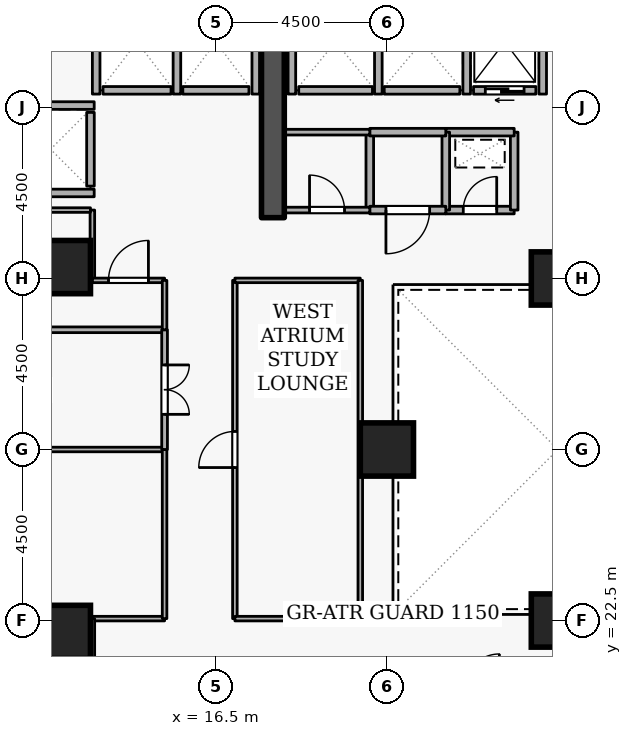
"""IFC4 building model, lengths in metres.
Left out: names, types, materials, properties, quantities, classifications, styles, units other than length and angle.
Written with IfcOpenShell. Run it as: python <this file> out.ifc"""

import sys

from ifc_helpers import new_model, si_unit, direction, frame, frame_2d, origin, origin_2d, place, context, subcontext, project, spatial, rectangle, extrude, element, fill, save


model = new_model("IFC4")
c1 = context("Model", 3, precision=1e-05, world=origin(), true_north=direction((0.0, 1.0)))
c2 = subcontext(c1, "Body", "Model", "MODEL_VIEW")
j1 = project(units=[si_unit("LENGTHUNIT", "METRE"), si_unit("PLANEANGLEUNIT", "RADIAN")], contexts=[c1])
p1 = place(None, origin())
s1 = spatial("IfcSite", under=j1, at=p1, CompositionType="ELEMENT")
p2 = place(p1, origin())
s2 = spatial("IfcBuilding", under=s1, at=p2, CompositionType="ELEMENT")
p3 = place(p2, frame((0.0, 0.0, 38.7)))
s3 = spatial("IfcBuildingStorey", under=s2, at=p3, CompositionType="ELEMENT", Elevation=38.7)
p4 = place(p3, frame((18.0, 33.1, 0.0), z_axis=(0.0, 0.0, 1.0), x_axis=(0.0, 1.0, 0.0)))
e1 = element("IfcWall", 1, at=p4, inside=s3, PredefinedType="SHEAR", context=c2, shape_type="SweptSolid", body=[
    extrude(rectangle(XDim=5.7, YDim=0.6, at=frame_2d((2.85, 0.0))), origin(), (0.0, 0.0, 1.0), 3.6),
])
for number, where, z_axis, x_axis in (
    (2, (12.5, 22.2, 0.0), (0.0, 0.0, 1.0), (1.0, 0.0, 0.0)),
    (3, (12.5, 31.8, 0.0), (0.0, 0.0, 1.0), (1.0, 0.0, 0.0)),
    (4, (25.5, 22.5, 0.0), (0.0, 0.0, 1.0), (1.0, 0.0, 0.0)),
    (5, (25.5, 31.5, 0.0), (0.0, 0.0, 1.0), (1.0, 0.0, 0.0)),
    (6, (21.0, 27.0, 0.0), (0.0, 0.0, 1.0), (1.0, 0.0, 0.0)),
):
    element("IfcColumn", number, at=place(p3, frame(where, z_axis=z_axis, x_axis=x_axis)), inside=s3, PredefinedType="COLUMN", context=c2, shape_type="SweptSolid", body=[
        extrude(rectangle(XDim=1.4, YDim=1.4, at=origin_2d()), origin(), (0.0, 0.0, 1.0), 3.6),
    ])
p5 = place(p3, frame((24.92, 36.45, 0.0), z_axis=(0.0, 0.0, 1.0), x_axis=(-1.0, 0.0, 0.0)))
e7 = element("IfcWall", 7, at=p5, inside=s3, PredefinedType="STANDARD", context=c2, shape_type="SweptSolid", body=[
    extrude(rectangle(XDim=1.64, YDim=0.2, at=frame_2d((0.82, 0.0))), origin(), (0.0, 0.0, 1.0), 3.34),
])
p6 = place(p5, frame((0.31, 0.0, 0.0)))
e8 = element("IfcOpeningElement", 8, at=p6, cuts=e7, PredefinedType="OPENING", context=c2, shape_type="SweptSolid", body=[
    extrude(rectangle(XDim=1.02, YDim=2.06, at=frame_2d((0.51, 1.03))), frame((0.0, 0.11, 0.0), z_axis=(0.0, -1.0, 0.0), x_axis=(1.0, 0.0, 0.0)), (0.0, 0.0, 1.0), 0.22),
])
p7 = place(p3, frame((22.92, 36.45, 0.0), z_axis=(0.0, 0.0, 1.0), x_axis=(-1.0, 0.0, 0.0)))
e9 = element("IfcWall", 9, at=p7, inside=s3, PredefinedType="STANDARD", context=c2, shape_type="SweptSolid", body=[
    extrude(rectangle(XDim=1.99, YDim=0.2, at=frame_2d((0.995, 0.0))), origin(), (0.0, 0.0, 1.0), 3.34),
])
p8 = place(p3, frame((20.62, 36.45, 0.0), z_axis=(0.0, 0.0, 1.0), x_axis=(-1.0, 0.0, 0.0)))
e10 = element("IfcWall", 10, at=p8, inside=s3, PredefinedType="STANDARD", context=c2, shape_type="SweptSolid", body=[
    extrude(rectangle(XDim=1.94, YDim=0.2, at=frame_2d((0.97, 0.0))), origin(), (0.0, 0.0, 1.0), 3.34),
])
p9 = place(p3, frame((17.37, 36.45, 0.0), z_axis=(0.0, 0.0, 1.0), x_axis=(-1.0, 0.0, 0.0)))
e11 = element("IfcWall", 11, at=p9, inside=s3, PredefinedType="STANDARD", context=c2, shape_type="SweptSolid", body=[
    extrude(rectangle(XDim=1.74, YDim=0.2, at=frame_2d((0.87, 0.0))), origin(), (0.0, 0.0, 1.0), 3.34),
])
p10 = place(p3, frame((15.32, 36.45, 0.0), z_axis=(0.0, 0.0, 1.0), x_axis=(-1.0, 0.0, 0.0)))
e12 = element("IfcWall", 12, at=p10, inside=s3, PredefinedType="STANDARD", context=c2, shape_type="SweptSolid", body=[
    extrude(rectangle(XDim=1.79, YDim=0.2, at=frame_2d((0.895, 0.0))), origin(), (0.0, 0.0, 1.0), 3.34),
])
p11 = place(p3, frame((13.2, 33.93, 0.0), z_axis=(0.0, 0.0, 1.0), x_axis=(0.0, 1.0, 0.0)))
e13 = element("IfcWall", 13, at=p11, inside=s3, PredefinedType="STANDARD", context=c2, shape_type="SweptSolid", body=[
    extrude(rectangle(XDim=1.94, YDim=0.2, at=frame_2d((0.97, 0.0))), origin(), (0.0, 0.0, 1.0), 3.34),
])
for number, where, z_axis, x_axis in (
    (14, (25.1, 36.352, 0.0), (0.0, 0.0, 1.0), (0.0, 1.0, 0.0)),
    (15, (23.1, 36.352, 0.0), (0.0, 0.0, 1.0), (0.0, 1.0, 0.0)),
    (16, (20.775, 36.352, 0.0), (0.0, 0.0, 1.0), (0.0, 1.0, 0.0)),
    (17, (18.5, 36.352, 0.0), (0.0, 0.0, 1.0), (0.0, 1.0, 0.0)),
):
    element("IfcWall", number, at=place(p3, frame(where, z_axis=z_axis, x_axis=x_axis)), inside=s3, PredefinedType="STANDARD", context=c2, shape_type="SweptSolid", body=[
        extrude(rectangle(XDim=2.436, YDim=0.2, at=frame_2d((1.218, 0.0))), origin(), (0.0, 0.0, 1.0), 3.34),
    ])
p12 = place(p3, frame((17.55, 36.352, 0.0), z_axis=(0.0, 0.0, 1.0), x_axis=(0.0, 1.0, 0.0)))
e18 = element("IfcWall", 18, at=p12, inside=s3, PredefinedType="STANDARD", context=c2, shape_type="SweptSolid", body=[
    extrude(rectangle(XDim=2.636, YDim=0.2, at=frame_2d((1.318, 0.0))), origin(), (0.0, 0.0, 1.0), 2.545),
])
for number, where, z_axis, x_axis in (
    (19, (15.475, 36.352, 0.0), (0.0, 0.0, 1.0), (0.0, 1.0, 0.0)),
    (20, (13.35, 36.352, 0.0), (0.0, 0.0, 1.0), (0.0, 1.0, 0.0)),
):
    element("IfcWall", number, at=place(p3, frame(where, z_axis=z_axis, x_axis=x_axis)), inside=s3, PredefinedType="STANDARD", context=c2, shape_type="SweptSolid", body=[
        extrude(rectangle(XDim=2.636, YDim=0.2, at=frame_2d((1.318, 0.0))), origin(), (0.0, 0.0, 1.0), 3.34),
    ])
for number, where, z_axis, x_axis in (
    (21, (11.002, 36.05, 0.0), (0.0, 0.0, 1.0), (1.0, 0.0, 0.0)),
    (22, (11.002, 33.75, 0.0), (0.0, 0.0, 1.0), (1.0, 0.0, 0.0)),
):
    element("IfcWall", number, at=place(p3, frame(where, z_axis=z_axis, x_axis=x_axis)), inside=s3, PredefinedType="STANDARD", context=c2, shape_type="SweptSolid", body=[
        extrude(rectangle(XDim=2.296, YDim=0.2, at=frame_2d((1.148, 0.0))), origin(), (0.0, 0.0, 1.0), 3.34),
    ])
p13 = place(p3, frame((22.55, 33.3, 0.0), z_axis=(0.0, 0.0, 1.0), x_axis=(1.0, 0.0, 0.0)))
e23 = element("IfcWall", 23, at=p13, inside=s3, PredefinedType="STANDARD", context=c2, shape_type="SweptSolid", body=[
    extrude(rectangle(XDim=1.8, YDim=0.2, at=frame_2d((0.9, 0.0))), origin(), (0.0, 0.0, 1.0), 3.34),
])
p14 = place(p13, frame((0.46, 0.0, 0.0)))
e24 = element("IfcOpeningElement", 24, at=p14, cuts=e23, PredefinedType="OPENING", context=c2, shape_type="SweptSolid", body=[
    extrude(rectangle(XDim=0.88, YDim=2.04, at=frame_2d((0.44, 1.02))), frame((0.0, 0.11, 0.0), z_axis=(0.0, -1.0, 0.0), x_axis=(1.0, 0.0, 0.0)), (0.0, 0.0, 1.0), 0.22),
])
p15 = place(p3, frame((24.35, 33.3, 0.0), z_axis=(0.0, 0.0, 1.0), x_axis=(0.0, 1.0, 0.0)))
e25 = element("IfcWall", 25, at=p15, inside=s3, PredefinedType="STANDARD", context=c2, shape_type="SweptSolid", body=[
    extrude(rectangle(XDim=2.05, YDim=0.2, at=frame_2d((1.025, 0.0))), origin(), (0.0, 0.0, 1.0), 3.34),
])
p16 = place(p3, frame((24.35, 35.35, 0.0), z_axis=(0.0, 0.0, 1.0), x_axis=(-1.0, 0.0, 0.0)))
e26 = element("IfcWall", 26, at=p16, inside=s3, PredefinedType="STANDARD", context=c2, shape_type="SweptSolid", body=[
    extrude(rectangle(XDim=1.8, YDim=0.2, at=frame_2d((0.9, 0.0))), origin(), (0.0, 0.0, 1.0), 3.34),
])
for number, where, z_axis, x_axis in (
    (27, (22.55, 35.35, 0.0), (0.0, 0.0, 1.0), (0.0, -1.0, 0.0)),
    (28, (20.55, 33.3, 0.0), (0.0, 0.0, 1.0), (0.0, 1.0, 0.0)),
):
    element("IfcWall", number, at=place(p3, frame(where, z_axis=z_axis, x_axis=x_axis)), inside=s3, PredefinedType="STANDARD", context=c2, shape_type="SweptSolid", body=[
        extrude(rectangle(XDim=2.05, YDim=0.2, at=frame_2d((1.025, 0.0))), origin(), (0.0, 0.0, 1.0), 3.34),
    ])
p17 = place(p3, frame((20.55, 35.35, 0.0), z_axis=(0.0, 0.0, 1.0), x_axis=(1.0, 0.0, 0.0)))
e29 = element("IfcWall", 29, at=p17, inside=s3, PredefinedType="STANDARD", context=c2, shape_type="SweptSolid", body=[
    extrude(rectangle(XDim=2.0, YDim=0.2, at=frame_2d((1.0, 0.0))), origin(), (0.0, 0.0, 1.0), 3.34),
])
p18 = place(p3, frame((22.55, 33.3, 0.0), z_axis=(0.0, 0.0, 1.0), x_axis=(-1.0, 0.0, 0.0)))
e30 = element("IfcWall", 30, at=p18, inside=s3, PredefinedType="STANDARD", context=c2, shape_type="SweptSolid", body=[
    extrude(rectangle(XDim=2.0, YDim=0.2, at=frame_2d((1.0, 0.0))), origin(), (0.0, 0.0, 1.0), 3.34),
])
p19 = place(p18, frame((0.425, 0.0, 0.0)))
e31 = element("IfcOpeningElement", 31, at=p19, cuts=e30, PredefinedType="OPENING", context=c2, shape_type="SweptSolid", body=[
    extrude(rectangle(XDim=1.15, YDim=2.1, at=frame_2d((0.575, 1.05))), frame((0.0, 0.11, 0.0), z_axis=(0.0, -1.0, 0.0), x_axis=(1.0, 0.0, 0.0)), (0.0, 0.0, 1.0), 0.22),
])
p20 = place(p3, frame((18.3, 33.3, 0.0), z_axis=(0.0, 0.0, 1.0), x_axis=(1.0, 0.0, 0.0)))
e32 = element("IfcWall", 32, at=p20, inside=s3, PredefinedType="PARTITIONING", context=c2, shape_type="SweptSolid", body=[
    extrude(rectangle(XDim=2.25, YDim=0.15, at=frame_2d((1.125, 0.0))), origin(), (0.0, 0.0, 1.0), 3.34),
])
p21 = place(p20, frame((0.665, 0.0, 0.0)))
e33 = element("IfcOpeningElement", 33, at=p21, cuts=e32, PredefinedType="OPENING", context=c2, shape_type="SweptSolid", body=[
    extrude(rectangle(XDim=0.92, YDim=2.08, at=frame_2d((0.46, 1.04))), frame((0.0, 0.085, 0.0), z_axis=(0.0, -1.0, 0.0), x_axis=(1.0, 0.0, 0.0)), (0.0, 0.0, 1.0), 0.17),
])
p22 = place(p3, frame((20.55, 35.35, 0.0), z_axis=(0.0, 0.0, 1.0), x_axis=(-1.0, 0.0, 0.0)))
e34 = element("IfcWall", 34, at=p22, inside=s3, PredefinedType="PARTITIONING", context=c2, shape_type="SweptSolid", body=[
    extrude(rectangle(XDim=2.25, YDim=0.15, at=frame_2d((1.125, 0.0))), origin(), (0.0, 0.0, 1.0), 3.34),
])
p23 = place(p3, frame((15.15, 22.55, 0.0), z_axis=(0.0, 0.0, 1.0), x_axis=(-1.0, 0.0, 0.0)))
e35 = element("IfcWall", 35, at=p23, inside=s3, PredefinedType="PARTITIONING", context=c2, shape_type="SweptSolid", body=[
    extrude(rectangle(XDim=1.9, YDim=0.12, at=frame_2d((0.95, 0.0))), origin(), (0.0, 0.0, 1.0), 3.34),
])
p24 = place(p3, frame((13.25, 22.55, 0.0), z_axis=(0.0, 0.0, 1.0), x_axis=(0.0, -1.0, 0.0)))
e36 = element("IfcWall", 36, at=p24, inside=s3, PredefinedType="PARTITIONING", context=c2, shape_type="SweptSolid", body=[
    extrude(rectangle(XDim=1.85, YDim=0.12, at=frame_2d((0.925, 0.0))), origin(), (0.0, 0.0, 1.0), 3.34),
])
p25 = place(p3, frame((1.28, 27.0, 0.0), z_axis=(0.0, 0.0, 1.0), x_axis=(1.0, 0.0, 0.0)))
e37 = element("IfcWall", 37, at=p25, inside=s3, PredefinedType="PARTITIONING", context=c2, shape_type="SweptSolid", body=[
    extrude(rectangle(XDim=13.87, YDim=0.12, at=frame_2d((6.935, 0.0))), origin(), (0.0, 0.0, 1.0), 2.882),
])
p26 = place(p3, frame((15.15, 27.0, 0.0), z_axis=(0.0, 0.0, 1.0), x_axis=(0.0, -1.0, 0.0)))
e38 = element("IfcWall", 38, at=p26, inside=s3, PredefinedType="PARTITIONING", context=c2, shape_type="SweptSolid", body=[
    extrude(rectangle(XDim=4.45, YDim=0.12, at=frame_2d((2.225, 0.0))), origin(), (0.0, 0.0, 1.0), 3.34),
])
p27 = place(p3, frame((1.28, 30.15, 0.0), z_axis=(0.0, 0.0, 1.0), x_axis=(1.0, 0.0, 0.0)))
e39 = element("IfcWall", 39, at=p27, inside=s3, PredefinedType="PARTITIONING", context=c2, shape_type="SweptSolid", body=[
    extrude(rectangle(XDim=13.87, YDim=0.15, at=frame_2d((6.935, 0.0))), origin(), (0.0, 0.0, 1.0), 3.34),
])
p28 = place(p3, frame((15.15, 30.15, 0.0), z_axis=(0.0, 0.0, 1.0), x_axis=(0.0, -1.0, 0.0)))
e40 = element("IfcWall", 40, at=p28, inside=s3, PredefinedType="PARTITIONING", context=c2, shape_type="SweptSolid", body=[
    extrude(rectangle(XDim=3.15, YDim=0.15, at=frame_2d((1.575, 0.0))), origin(), (0.0, 0.0, 1.0), 3.34),
])
p29 = place(p28, frame((0.925, 0.0, 0.0)))
e41 = element("IfcOpeningElement", 41, at=p29, cuts=e40, PredefinedType="OPENING", context=c2, shape_type="SweptSolid", body=[
    extrude(rectangle(XDim=1.3, YDim=2.12, at=frame_2d((0.65, 1.06))), frame((0.0, 0.085, 0.0), z_axis=(0.0, -1.0, 0.0), x_axis=(1.0, 0.0, 0.0)), (0.0, 0.0, 1.0), 0.17),
])
p30 = place(p3, frame((13.25, 33.3, 0.0), z_axis=(0.0, 0.0, 1.0), x_axis=(0.0, -1.0, 0.0)))
e42 = element("IfcWall", 42, at=p30, inside=s3, PredefinedType="PARTITIONING", context=c2, shape_type="SweptSolid", body=[
    extrude(rectangle(XDim=1.85, YDim=0.12, at=frame_2d((0.925, 0.0))), origin(), (0.0, 0.0, 1.0), 3.34),
])
p31 = place(p3, frame((13.25, 31.45, 0.0), z_axis=(0.0, 0.0, 1.0), x_axis=(1.0, 0.0, 0.0)))
e43 = element("IfcWall", 43, at=p31, inside=s3, PredefinedType="PARTITIONING", context=c2, shape_type="SweptSolid", body=[
    extrude(rectangle(XDim=1.9, YDim=0.12, at=frame_2d((0.95, 0.0))), origin(), (0.0, 0.0, 1.0), 3.34),
])
p32 = place(p31, frame((0.425, 0.0, 0.0)))
e44 = element("IfcOpeningElement", 44, at=p32, cuts=e43, PredefinedType="OPENING", context=c2, shape_type="SweptSolid", body=[
    extrude(rectangle(XDim=1.05, YDim=2.1, at=frame_2d((0.525, 1.05))), frame((0.0, 0.07, 0.0), z_axis=(0.0, -1.0, 0.0), x_axis=(1.0, 0.0, 0.0)), (0.0, 0.0, 1.0), 0.14),
])
p33 = place(p3, frame((15.15, 31.45, 0.0), z_axis=(0.0, 0.0, 1.0), x_axis=(0.0, -1.0, 0.0)))
e45 = element("IfcWall", 45, at=p33, inside=s3, PredefinedType="PARTITIONING", context=c2, shape_type="SweptSolid", body=[
    extrude(rectangle(XDim=1.3, YDim=0.12, at=frame_2d((0.65, 0.0))), origin(), (0.0, 0.0, 1.0), 3.34),
])
p34 = place(p3, frame((10.9, 33.3, 0.0), z_axis=(0.0, 0.0, 1.0), x_axis=(1.0, 0.0, 0.0)))
e46 = element("IfcWall", 46, at=p34, inside=s3, PredefinedType="PARTITIONING", context=c2, shape_type="SweptSolid", body=[
    extrude(rectangle(XDim=2.3, YDim=0.12, at=frame_2d((1.15, 0.0))), origin(), (0.0, 0.0, 1.0), 3.34),
])
p35 = place(p3, frame((17.0, 22.55, 0.0), z_axis=(0.0, 0.0, 1.0), x_axis=(0.0, 1.0, 0.0)))
e47 = element("IfcWall", 47, at=p35, inside=s3, PredefinedType="PARTITIONING", context=c2, shape_type="SweptSolid", body=[
    extrude(rectangle(XDim=8.9, YDim=0.12, at=frame_2d((4.45, 0.0))), origin(), (0.0, 0.0, 1.0), 3.34),
])
p36 = place(p35, frame((3.975, 0.0, 0.0)))
e48 = element("IfcOpeningElement", 48, at=p36, cuts=e47, PredefinedType="OPENING", context=c2, shape_type="SweptSolid", body=[
    extrude(rectangle(XDim=0.95, YDim=2.1, at=frame_2d((0.475, 1.05))), frame((0.0, 0.07, 0.0), z_axis=(0.0, -1.0, 0.0), x_axis=(1.0, 0.0, 0.0)), (0.0, 0.0, 1.0), 0.14),
])
p37 = place(p3, frame((17.0, 31.45, 0.0), z_axis=(0.0, 0.0, 1.0), x_axis=(1.0, 0.0, 0.0)))
e49 = element("IfcWall", 49, at=p37, inside=s3, PredefinedType="PARTITIONING", context=c2, shape_type="SweptSolid", body=[
    extrude(rectangle(XDim=3.3, YDim=0.12, at=frame_2d((1.65, 0.0))), origin(), (0.0, 0.0, 1.0), 3.34),
])
p38 = place(p3, frame((20.3, 31.45, 0.0), z_axis=(0.0, 0.0, 1.0), x_axis=(0.0, -1.0, 0.0)))
e50 = element("IfcWall", 50, at=p38, inside=s3, PredefinedType="PARTITIONING", context=c2, shape_type="SweptSolid", body=[
    extrude(rectangle(XDim=8.9, YDim=0.12, at=frame_2d((4.45, 0.0))), origin(), (0.0, 0.0, 1.0), 3.34),
])
p39 = place(p3, frame((20.3, 22.55, 0.0), z_axis=(0.0, 0.0, 1.0), x_axis=(-1.0, 0.0, 0.0)))
e51 = element("IfcWall", 51, at=p39, inside=s3, PredefinedType="PARTITIONING", context=c2, shape_type="SweptSolid", body=[
    extrude(rectangle(XDim=3.3, YDim=0.12, at=frame_2d((1.65, 0.0))), origin(), (0.0, 0.0, 1.0), 3.34),
])
p40 = place(p6, origin())
e52 = element("IfcDoor", 52, at=p40, inside=s3, OperationType="SLIDING_TO_LEFT", PredefinedType="DOOR", context=c2, shape_type="SweptSolid", body=[
    extrude(rectangle(XDim=1.02, YDim=2.06, at=frame_2d((0.51, 1.03))), frame((0.0, 0.025, 0.0), z_axis=(0.0, -1.0, 0.0), x_axis=(1.0, 0.0, 0.0)), (0.0, 0.0, 1.0), 0.05),
])
fill(e8, e52)
p41 = place(p14, origin())
e53 = element("IfcDoor", 53, at=p41, inside=s3, OperationType="SINGLE_SWING_RIGHT", PredefinedType="DOOR", context=c2, shape_type="SweptSolid", body=[
    extrude(rectangle(XDim=0.88, YDim=2.04, at=frame_2d((0.44, 1.02))), frame((0.0, 0.025, 0.0), z_axis=(0.0, -1.0, 0.0), x_axis=(1.0, 0.0, 0.0)), (0.0, 0.0, 1.0), 0.05),
])
fill(e24, e53)
p42 = place(p21, origin())
e54 = element("IfcDoor", 54, at=p42, inside=s3, OperationType="SINGLE_SWING_LEFT", PredefinedType="DOOR", context=c2, shape_type="SweptSolid", body=[
    extrude(rectangle(XDim=0.92, YDim=2.08, at=frame_2d((0.46, 1.04))), frame((0.0, 0.025, 0.0), z_axis=(0.0, -1.0, 0.0), x_axis=(1.0, 0.0, 0.0)), (0.0, 0.0, 1.0), 0.05),
])
fill(e33, e54)
p43 = place(p19, origin())
e55 = element("IfcDoor", 55, at=p43, inside=s3, OperationType="SINGLE_SWING_RIGHT", PredefinedType="DOOR", context=c2, shape_type="SweptSolid", body=[
    extrude(rectangle(XDim=1.15, YDim=2.1, at=frame_2d((0.575, 1.05))), frame((0.0, 0.025, 0.0), z_axis=(0.0, -1.0, 0.0), x_axis=(1.0, 0.0, 0.0)), (0.0, 0.0, 1.0), 0.05),
])
fill(e31, e55)
p44 = place(p29, origin())
e56 = element("IfcDoor", 56, at=p44, inside=s3, OperationType="DOUBLE_DOOR_SINGLE_SWING", PredefinedType="DOOR", context=c2, shape_type="SweptSolid", body=[
    extrude(rectangle(XDim=1.3, YDim=2.12, at=frame_2d((0.65, 1.06))), frame((0.0, 0.025, 0.0), z_axis=(0.0, -1.0, 0.0), x_axis=(1.0, 0.0, 0.0)), (0.0, 0.0, 1.0), 0.05),
])
fill(e41, e56)
p45 = place(p32, origin())
e57 = element("IfcDoor", 57, at=p45, inside=s3, OperationType="SINGLE_SWING_RIGHT", PredefinedType="DOOR", context=c2, shape_type="SweptSolid", body=[
    extrude(rectangle(XDim=1.05, YDim=2.1, at=frame_2d((0.525, 1.05))), frame((0.0, 0.025, 0.0), z_axis=(0.0, -1.0, 0.0), x_axis=(1.0, 0.0, 0.0)), (0.0, 0.0, 1.0), 0.05),
])
fill(e44, e57)
p46 = place(p36, origin())
e58 = element("IfcDoor", 58, at=p46, inside=s3, OperationType="SINGLE_SWING_LEFT", PredefinedType="DOOR", context=c2, shape_type="SweptSolid", body=[
    extrude(rectangle(XDim=0.95, YDim=2.1, at=frame_2d((0.475, 1.05))), frame((0.0, 0.025, 0.0), z_axis=(0.0, -1.0, 0.0), x_axis=(1.0, 0.0, 0.0)), (0.0, 0.0, 1.0), 0.05),
])
fill(e48, e58)
save(model, sys.argv[1])
